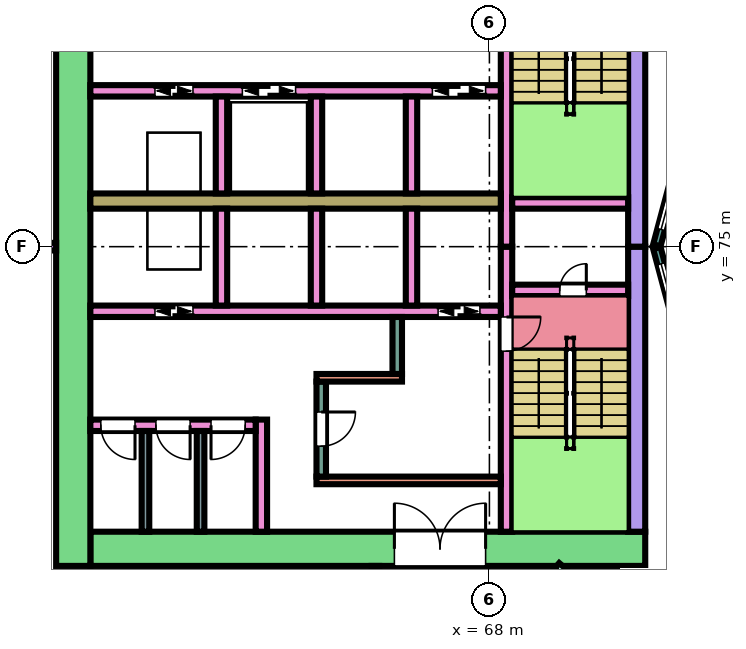
"""IFC4 building model, lengths in metres.
Left out: names, types, materials, properties, quantities, classifications, styles, units other than length and angle.
Written with IfcOpenShell. Run it as: python <this file> out.ifc"""

import sys

from ifc_helpers import new_model, si_unit, direction, frame, frame_2d, origin, place, context, subcontext, project, spatial, rectangle, extrude, element, fill, save


model = new_model("IFC4")
c1 = context("Model", 3, precision=1e-05, world=origin(), true_north=direction((0.0, 1.0)))
c2 = subcontext(c1, "Body", "Model", "MODEL_VIEW")
j1 = project(units=[si_unit("LENGTHUNIT", "METRE"), si_unit("PLANEANGLEUNIT", "RADIAN")], contexts=[c1])
p1 = place(None, origin())
s1 = spatial("IfcSite", under=j1, at=p1, CompositionType="ELEMENT")
p2 = place(p1, origin())
s2 = spatial("IfcBuilding", under=s1, at=p2, CompositionType="ELEMENT")
p3 = place(p2, frame((0.0, 0.0, 17.8)))
s3 = spatial("IfcBuildingStorey", under=s2, at=p3, CompositionType="ELEMENT", Elevation=17.8)
p4 = place(p3, frame((72.1, 67.05, 0.0), z_axis=(0.0, 0.0, 1.0), x_axis=(-1.0, 0.0, 0.0)))
e1 = element("IfcWall", 1, at=p4, inside=s3, PredefinedType="SHEAR", context=c2, shape_type="SweptSolid", body=[
    extrude(rectangle(XDim=14.6, YDim=0.9, at=frame_2d((7.3, 0.0))), origin(), (0.0, 0.0, 1.0), 5.55),
])
p5 = place(p4, frame((4.2, 0.0, 0.0)))
e2 = element("IfcOpeningElement", 2, at=p5, cuts=e1, PredefinedType="OPENING", context=c2, shape_type="SweptSolid", body=[
    extrude(rectangle(XDim=2.4, YDim=2.4, at=frame_2d((1.2, 1.2))), frame((0.0, 0.46, 0.0), z_axis=(0.0, -1.0, 0.0), x_axis=(1.0, 0.0, 0.0)), (0.0, 0.0, 1.0), 0.92),
])
for number, where, z_axis, x_axis in (
    (3, (71.875, 75.0, 0.0), (0.0, 0.0, 1.0), (0.0, -1.0, 0.0)),
    (4, (71.875, 82.5, 0.0), (0.0, 0.0, 1.0), (0.0, -1.0, 0.0)),
):
    element("IfcWall", number, at=place(p3, frame(where, z_axis=z_axis, x_axis=x_axis)), inside=s3, PredefinedType="SHEAR", context=c2, shape_type="SweptSolid", body=[
        extrude(rectangle(XDim=7.5, YDim=0.45, at=frame_2d((3.75, 0.0))), origin(), (0.0, 0.0, 1.0), 5.55),
    ])
p6 = place(p3, frame((57.05, 83.4, 0.0), z_axis=(0.0, 0.0, 1.0), x_axis=(0.0, -1.0, 0.0)))
e5 = element("IfcWall", 5, at=p6, inside=s3, PredefinedType="SHEAR", context=c2, shape_type="SweptSolid", body=[
    extrude(rectangle(XDim=16.8, YDim=0.9, at=frame_2d((8.4, 0.0))), origin(), (0.0, 0.0, 1.0), 5.55),
])
p7 = place(p3, frame((68.45, 75.0, 0.0), z_axis=(0.0, 0.0, 1.0), x_axis=(0.0, -1.0, 0.0)))
e6 = element("IfcWall", 6, at=p7, inside=s3, PredefinedType="SHEAR", context=c2, shape_type="SweptSolid", body=[
    extrude(rectangle(XDim=7.5, YDim=0.3, at=frame_2d((3.75, 0.0))), origin(), (0.0, 0.0, 1.0), 5.55),
])
p8 = place(p7, frame((1.85, 0.0, 0.0)))
e7 = element("IfcOpeningElement", 7, at=p8, cuts=e6, PredefinedType="OPENING", context=c2, shape_type="SweptSolid", body=[
    extrude(rectangle(XDim=0.9, YDim=2.1, at=frame_2d((0.45, 1.05))), frame((0.0, 0.16, 0.0), z_axis=(0.0, -1.0, 0.0), x_axis=(1.0, 0.0, 0.0)), (0.0, 0.0, 1.0), 0.32),
])
p9 = place(p3, frame((68.45, 82.5, 0.0), z_axis=(0.0, 0.0, 1.0), x_axis=(0.0, -1.0, 0.0)))
e8 = element("IfcWall", 8, at=p9, inside=s3, PredefinedType="SHEAR", context=c2, shape_type="SweptSolid", body=[
    extrude(rectangle(XDim=7.5, YDim=0.3, at=frame_2d((3.75, 0.0))), origin(), (0.0, 0.0, 1.0), 5.55),
])
p10 = place(p9, frame((0.15, 0.0, 0.0)))
e9 = element("IfcOpeningElement", 9, at=p10, cuts=e8, PredefinedType="OPENING", context=c2, shape_type="SweptSolid", body=[
    extrude(rectangle(XDim=0.9, YDim=2.1, at=frame_2d((0.45, 1.05))), frame((0.0, 0.16, 0.0), z_axis=(0.0, -1.0, 0.0), x_axis=(1.0, 0.0, 0.0)), (0.0, 0.0, 1.0), 0.32),
])
p11 = place(p3, frame((71.65, 73.85, 0.0), z_axis=(0.0, 0.0, 1.0), x_axis=(-1.0, 0.0, 0.0)))
e10 = element("IfcWall", 10, at=p11, inside=s3, PredefinedType="SHEAR", context=c2, shape_type="SweptSolid", body=[
    extrude(rectangle(XDim=3.05, YDim=0.3, at=frame_2d((1.525, 0.0))), origin(), (0.0, 0.0, 1.0), 5.55),
])
p12 = place(p11, frame((1.1, 0.0, 0.0)))
e11 = element("IfcOpeningElement", 11, at=p12, cuts=e10, PredefinedType="OPENING", context=c2, shape_type="SweptSolid", body=[
    extrude(rectangle(XDim=0.7, YDim=2.0, at=frame_2d((0.35, 1.0))), frame((0.0, 0.16, 0.0), z_axis=(0.0, -1.0, 0.0), x_axis=(1.0, 0.0, 0.0)), (0.0, 0.0, 1.0), 0.32),
])
p13 = place(p3, frame((71.65, 76.15, 0.0), z_axis=(0.0, 0.0, 1.0), x_axis=(-1.0, 0.0, 0.0)))
e12 = element("IfcWall", 12, at=p13, inside=s3, PredefinedType="SHEAR", context=c2, shape_type="SweptSolid", body=[
    extrude(rectangle(XDim=3.05, YDim=0.3, at=frame_2d((1.525, 0.0))), origin(), (0.0, 0.0, 1.0), 5.55),
])
p14 = place(p3, frame((68.3, 73.3, 0.0), z_axis=(0.0, 0.0, 1.0), x_axis=(-1.0, 0.0, 0.0)))
e13 = element("IfcWall", 13, at=p14, inside=s3, PredefinedType="SHEAR", context=c2, shape_type="SweptSolid", body=[
    extrude(rectangle(XDim=10.8, YDim=0.3, at=frame_2d((5.4, 0.0))), origin(), (0.0, 0.0, 1.0), 5.55),
])
p15 = place(p14, frame((0.55, 0.0, 0.0)))
e14 = element("IfcOpeningElement", 14, at=p15, cuts=e13, PredefinedType="OPENING", context=c2, shape_type="SweptSolid", body=[
    extrude(rectangle(XDim=1.1, YDim=2.1, at=frame_2d((0.55, 1.05))), frame((0.0, 0.16, 0.0), z_axis=(0.0, -1.0, 0.0), x_axis=(1.0, 0.0, 0.0)), (0.0, 0.0, 1.0), 0.32),
])
p16 = place(p14, frame((8.1, 0.0, 0.0)))
e15 = element("IfcOpeningElement", 15, at=p16, cuts=e13, PredefinedType="OPENING", context=c2, shape_type="SweptSolid", body=[
    extrude(rectangle(XDim=1.0, YDim=2.1, at=frame_2d((0.5, 1.05))), frame((0.0, 0.16, 0.0), z_axis=(0.0, -1.0, 0.0), x_axis=(1.0, 0.0, 0.0)), (0.0, 0.0, 1.0), 0.32),
])
p17 = place(p3, frame((68.3, 76.2, 0.0), z_axis=(0.0, 0.0, 1.0), x_axis=(-1.0, 0.0, 0.0)))
e16 = element("IfcWall", 16, at=p17, inside=s3, PredefinedType="SHEAR", context=c2, shape_type="SweptSolid", body=[
    extrude(rectangle(XDim=10.8, YDim=0.4, at=frame_2d((5.4, 0.0))), origin(), (0.0, 0.0, 1.0), 5.55),
])
p18 = place(p3, frame((68.3, 79.1, 0.0), z_axis=(0.0, 0.0, 1.0), x_axis=(-1.0, 0.0, 0.0)))
e17 = element("IfcWall", 17, at=p18, inside=s3, PredefinedType="SHEAR", context=c2, shape_type="SweptSolid", body=[
    extrude(rectangle(XDim=10.8, YDim=0.3, at=frame_2d((5.4, 0.0))), origin(), (0.0, 0.0, 1.0), 5.55),
])
p19 = place(p18, frame((0.4, 0.0, 0.0)))
e18 = element("IfcOpeningElement", 18, at=p19, cuts=e17, PredefinedType="OPENING", context=c2, shape_type="SweptSolid", body=[
    extrude(rectangle(XDim=1.4, YDim=2.1, at=frame_2d((0.7, 1.05))), frame((0.0, 0.16, 0.0), z_axis=(0.0, -1.0, 0.0), x_axis=(1.0, 0.0, 0.0)), (0.0, 0.0, 1.0), 0.32),
])
p20 = place(p18, frame((5.4, 0.0, 0.0)))
e19 = element("IfcOpeningElement", 19, at=p20, cuts=e17, PredefinedType="OPENING", context=c2, shape_type="SweptSolid", body=[
    extrude(rectangle(XDim=1.4, YDim=2.1, at=frame_2d((0.7, 1.05))), frame((0.0, 0.16, 0.0), z_axis=(0.0, -1.0, 0.0), x_axis=(1.0, 0.0, 0.0)), (0.0, 0.0, 1.0), 0.32),
])
p21 = place(p18, frame((8.1, 0.0, 0.0)))
e20 = element("IfcOpeningElement", 20, at=p21, cuts=e17, PredefinedType="OPENING", context=c2, shape_type="SweptSolid", body=[
    extrude(rectangle(XDim=1.0, YDim=2.1, at=frame_2d((0.5, 1.05))), frame((0.0, 0.16, 0.0), z_axis=(0.0, -1.0, 0.0), x_axis=(1.0, 0.0, 0.0)), (0.0, 0.0, 1.0), 0.32),
])
for number, where, z_axis, x_axis in (
    (21, (65.95, 76.0, 0.0), (0.0, 0.0, 1.0), (0.0, -1.0, 0.0)),
    (22, (63.45, 76.0, 0.0), (0.0, 0.0, 1.0), (0.0, -1.0, 0.0)),
    (23, (60.95, 76.0, 0.0), (0.0, 0.0, 1.0), (0.0, -1.0, 0.0)),
    (24, (65.95, 78.95, 0.0), (0.0, 0.0, 1.0), (0.0, -1.0, 0.0)),
    (25, (63.45, 78.95, 0.0), (0.0, 0.0, 1.0), (0.0, -1.0, 0.0)),
    (26, (60.95, 78.95, 0.0), (0.0, 0.0, 1.0), (0.0, -1.0, 0.0)),
):
    element("IfcWall", number, at=place(p3, frame(where, z_axis=z_axis, x_axis=x_axis)), inside=s3, PredefinedType="SHEAR", context=c2, shape_type="SweptSolid", body=[
        extrude(rectangle(XDim=2.55, YDim=0.3, at=frame_2d((1.275, 0.0))), origin(), (0.0, 0.0, 1.0), 5.55),
    ])
p22 = place(p3, frame((68.3, 68.85, 0.0), z_axis=(0.0, 0.0, 1.0), x_axis=(-1.0, 0.0, 0.0)))
e27 = element("IfcWall", 27, at=p22, inside=s3, PredefinedType="SHEAR", context=c2, shape_type="SweptSolid", body=[
    extrude(rectangle(XDim=4.85, YDim=0.2, at=frame_2d((2.425, 0.0))), origin(), (0.0, 0.0, 1.0), 5.55),
])
p23 = place(p3, frame((63.575, 71.45, 0.0), z_axis=(0.0, 0.0, 1.0), x_axis=(0.0, -1.0, 0.0)))
e28 = element("IfcWall", 28, at=p23, inside=s3, PredefinedType="SHEAR", context=c2, shape_type="SweptSolid", body=[
    extrude(rectangle(XDim=2.5, YDim=0.25, at=frame_2d((1.25, 0.0))), origin(), (0.0, 0.0, 1.0), 5.55),
])
p24 = place(p23, frame((0.8, 0.0, 0.0)))
e29 = element("IfcOpeningElement", 29, at=p24, cuts=e28, PredefinedType="OPENING", context=c2, shape_type="SweptSolid", body=[
    extrude(rectangle(XDim=0.9, YDim=2.1, at=frame_2d((0.45, 1.05))), frame((0.0, 0.135, 0.0), z_axis=(0.0, -1.0, 0.0), x_axis=(1.0, 0.0, 0.0)), (0.0, 0.0, 1.0), 0.27),
])
p25 = place(p3, frame((65.7, 71.55, 0.0), z_axis=(0.0, 0.0, 1.0), x_axis=(-1.0, 0.0, 0.0)))
e30 = element("IfcWall", 30, at=p25, inside=s3, PredefinedType="SHEAR", context=c2, shape_type="SweptSolid", body=[
    extrude(rectangle(XDim=2.25, YDim=0.2, at=frame_2d((1.125, 0.0))), origin(), (0.0, 0.0, 1.0), 5.55),
])
p26 = place(p3, frame((65.575, 73.15, 0.0), z_axis=(0.0, 0.0, 1.0), x_axis=(0.0, -1.0, 0.0)))
e31 = element("IfcWall", 31, at=p26, inside=s3, PredefinedType="SHEAR", context=c2, shape_type="SweptSolid", body=[
    extrude(rectangle(XDim=1.5, YDim=0.25, at=frame_2d((0.75, 0.0))), origin(), (0.0, 0.0, 1.0), 5.55),
])
p27 = place(p3, frame((62.0, 70.45, 0.0), z_axis=(0.0, 0.0, 1.0), x_axis=(0.0, -1.0, 0.0)))
e32 = element("IfcWall", 32, at=p27, inside=s3, PredefinedType="SHEAR", context=c2, shape_type="SweptSolid", body=[
    extrude(rectangle(XDim=2.95, YDim=0.3, at=frame_2d((1.475, 0.0))), origin(), (0.0, 0.0, 1.0), 5.55),
])
p28 = place(p3, frame((61.85, 70.3, 0.0), z_axis=(0.0, 0.0, 1.0), x_axis=(-1.0, 0.0, 0.0)))
e33 = element("IfcWall", 33, at=p28, inside=s3, PredefinedType="SHEAR", context=c2, shape_type="SweptSolid", body=[
    extrude(rectangle(XDim=4.35, YDim=0.3, at=frame_2d((2.175, 0.0))), origin(), (0.0, 0.0, 1.0), 5.55),
])
p29 = place(p28, frame((0.275, 0.0, 0.0)))
e34 = element("IfcOpeningElement", 34, at=p29, cuts=e33, PredefinedType="OPENING", context=c2, shape_type="SweptSolid", body=[
    extrude(rectangle(XDim=0.9, YDim=2.1, at=frame_2d((0.45, 1.05))), frame((0.0, 0.16, 0.0), z_axis=(0.0, -1.0, 0.0), x_axis=(1.0, 0.0, 0.0)), (0.0, 0.0, 1.0), 0.32),
])
p30 = place(p28, frame((1.725, 0.0, 0.0)))
e35 = element("IfcOpeningElement", 35, at=p30, cuts=e33, PredefinedType="OPENING", context=c2, shape_type="SweptSolid", body=[
    extrude(rectangle(XDim=0.9, YDim=2.1, at=frame_2d((0.45, 1.05))), frame((0.0, 0.16, 0.0), z_axis=(0.0, -1.0, 0.0), x_axis=(1.0, 0.0, 0.0)), (0.0, 0.0, 1.0), 0.32),
])
p31 = place(p28, frame((3.175, 0.0, 0.0)))
e36 = element("IfcOpeningElement", 36, at=p31, cuts=e33, PredefinedType="OPENING", context=c2, shape_type="SweptSolid", body=[
    extrude(rectangle(XDim=0.9, YDim=2.1, at=frame_2d((0.45, 1.05))), frame((0.0, 0.16, 0.0), z_axis=(0.0, -1.0, 0.0), x_axis=(1.0, 0.0, 0.0)), (0.0, 0.0, 1.0), 0.32),
])
p32 = place(p3, frame((73.415, 78.802, 0.0), z_axis=(0.0, 0.0, 1.0), x_axis=(-0.258789828301, -0.965933654434, 0.0)))
e37 = element("IfcWall", 37, at=p32, inside=s3, PredefinedType="NOTDEFINED", context=c2, shape_type="SweptSolid", body=[
    extrude(rectangle(XDim=3.936, YDim=0.2, at=frame_2d((1.968, 0.0))), origin(), (0.0, 0.0, 1.0), 6.0),
])
p33 = place(p32, frame((0.468, 0.0, 0.9)))
e38 = element("IfcOpeningElement", 38, at=p33, cuts=e37, PredefinedType="OPENING", context=c2, shape_type="SweptSolid", body=[
    extrude(rectangle(XDim=3.0, YDim=2.3, at=frame_2d((1.5, 1.15))), frame((0.0, 0.11, 0.0), z_axis=(0.0, -1.0, 0.0), x_axis=(1.0, 0.0, 0.0)), (0.0, 0.0, 1.0), 0.22),
])
p34 = place(p3, frame((72.396, 75.0, 0.0), z_axis=(0.0, 0.0, 1.0), x_axis=(0.258789828301, -0.965933654434, 0.0)))
e39 = element("IfcWall", 39, at=p34, inside=s3, PredefinedType="NOTDEFINED", context=c2, shape_type="SweptSolid", body=[
    extrude(rectangle(XDim=3.936, YDim=0.2, at=frame_2d((1.968, 0.0))), origin(), (0.0, 0.0, 1.0), 6.0),
])
p35 = place(p34, frame((0.468, 0.0, 0.9)))
e40 = element("IfcOpeningElement", 40, at=p35, cuts=e39, PredefinedType="OPENING", context=c2, shape_type="SweptSolid", body=[
    extrude(rectangle(XDim=3.0, YDim=2.3, at=frame_2d((1.5, 1.15))), frame((0.0, 0.11, 0.0), z_axis=(0.0, -1.0, 0.0), x_axis=(1.0, 0.0, 0.0)), (0.0, 0.0, 1.0), 0.22),
])
p36 = place(p3, frame((47.703, 75.0, 0.0), z_axis=(0.0, 0.0, 1.0), x_axis=(1.0, 0.0, 0.0)))
e41 = element("IfcWall", 41, at=p36, inside=s3, PredefinedType="PARTITIONING", context=c2, shape_type="SweptSolid", body=[
    extrude(rectangle(XDim=8.896, YDim=0.2, at=frame_2d((4.448, 0.0))), origin(), (0.0, 0.0, 1.0), 4.55),
])
p37 = place(p3, frame((65.0, 65.2, 0.0), z_axis=(0.0, 0.0, 1.0), x_axis=(0.0, 1.0, 0.0)))
e42 = element("IfcWall", 42, at=p37, inside=s3, PredefinedType="PARTITIONING", context=c2, shape_type="SweptSolid", body=[
    extrude(rectangle(XDim=1.399, YDim=0.2, at=frame_2d((0.7, 0.0))), origin(), (0.0, 0.0, 1.0), 5.55),
])
p38 = place(p37, frame((0.2, 0.0, 0.0)))
e43 = element("IfcOpeningElement", 43, at=p38, cuts=e42, PredefinedType="OPENING", context=c2, shape_type="SweptSolid", body=[
    extrude(rectangle(XDim=0.9, YDim=2.1, at=frame_2d((0.45, 1.05))), frame((0.0, 0.11, 0.0), z_axis=(0.0, -1.0, 0.0), x_axis=(1.0, 0.0, 0.0)), (0.0, 0.0, 1.0), 0.22),
])
p39 = place(p3, frame((69.771, 66.6, 0.0), z_axis=(0.0, 0.0, 1.0), x_axis=(0.758040611529, -0.652207352974, 0.0)))
e44 = element("IfcWall", 44, at=p39, inside=s3, PredefinedType="PARTITIONING", context=c2, shape_type="SweptSolid", body=[
    extrude(rectangle(XDim=4.625, YDim=0.2, at=frame_2d((2.312, 0.0))), origin(), (0.0, 0.0, 1.0), 5.55),
])
p40 = place(p39, frame((1.887, 0.0, 0.0)))
e45 = element("IfcOpeningElement", 45, at=p40, cuts=e44, PredefinedType="OPENING", context=c2, shape_type="SweptSolid", body=[
    extrude(rectangle(XDim=0.9, YDim=2.1, at=frame_2d((0.45, 1.05))), frame((0.0, 0.11, 0.0), z_axis=(0.0, -1.0, 0.0), x_axis=(1.0, 0.0, 0.0)), (0.0, 0.0, 1.0), 0.22),
])
for number, where, z_axis, x_axis in (
    (46, (60.4, 70.15, 0.0), (0.0, 0.0, 1.0), (0.0, -1.0, 0.0)),
    (47, (58.95, 70.15, 0.0), (0.0, 0.0, 1.0), (0.0, -1.0, 0.0)),
):
    element("IfcWall", number, at=place(p3, frame(where, z_axis=z_axis, x_axis=x_axis)), inside=s3, PredefinedType="PARTITIONING", context=c2, shape_type="SweptSolid", body=[
        extrude(rectangle(XDim=2.65, YDim=0.2, at=frame_2d((1.325, 0.0))), origin(), (0.0, 0.0, 1.0), 5.55),
    ])
p41 = place(p33, origin())
e48 = element("IfcWindow", 48, at=p41, inside=s3, PartitioningType="SINGLE_PANEL", PredefinedType="WINDOW", context=c2, shape_type="SweptSolid", body=[
    extrude(rectangle(XDim=3.0, YDim=2.3, at=frame_2d((1.5, 1.15))), frame((0.0, 0.03, 0.0), z_axis=(0.0, -1.0, 0.0), x_axis=(1.0, 0.0, 0.0)), (0.0, 0.0, 1.0), 0.06),
])
fill(e38, e48)
p42 = place(p35, origin())
e49 = element("IfcWindow", 49, at=p42, inside=s3, PartitioningType="SINGLE_PANEL", PredefinedType="WINDOW", context=c2, shape_type="SweptSolid", body=[
    extrude(rectangle(XDim=3.0, YDim=2.3, at=frame_2d((1.5, 1.15))), frame((0.0, 0.03, 0.0), z_axis=(0.0, -1.0, 0.0), x_axis=(1.0, 0.0, 0.0)), (0.0, 0.0, 1.0), 0.06),
])
fill(e40, e49)
p43 = place(p12, frame((0.7, 0.0, 0.0), z_axis=(0.0, 0.0, 1.0), x_axis=(-1.0, 0.0, 0.0)))
e50 = element("IfcDoor", 50, at=p43, inside=s3, OperationType="SINGLE_SWING_RIGHT", PredefinedType="DOOR", context=c2, shape_type="SweptSolid", body=[
    extrude(rectangle(XDim=0.7, YDim=2.0, at=frame_2d((0.35, 1.0))), frame((0.0, 0.025, 0.0), z_axis=(0.0, -1.0, 0.0), x_axis=(1.0, 0.0, 0.0)), (0.0, 0.0, 1.0), 0.05),
])
fill(e11, e50)
p44 = place(p8, origin())
e51 = element("IfcDoor", 51, at=p44, inside=s3, OperationType="SINGLE_SWING_LEFT", PredefinedType="DOOR", context=c2, shape_type="SweptSolid", body=[
    extrude(rectangle(XDim=0.9, YDim=2.1, at=frame_2d((0.45, 1.05))), frame((0.0, 0.025, 0.0), z_axis=(0.0, -1.0, 0.0), x_axis=(1.0, 0.0, 0.0)), (0.0, 0.0, 1.0), 0.05),
])
fill(e7, e51)
p45 = place(p15, origin())
e52 = element("IfcDoor", 52, at=p45, inside=s3, OperationType="DOUBLE_DOOR_SLIDING", PredefinedType="DOOR", context=c2, shape_type="SweptSolid", body=[
    extrude(rectangle(XDim=1.1, YDim=2.1, at=frame_2d((0.55, 1.05))), frame((0.0, 0.025, 0.0), z_axis=(0.0, -1.0, 0.0), x_axis=(1.0, 0.0, 0.0)), (0.0, 0.0, 1.0), 0.05),
])
fill(e14, e52)
p46 = place(p16, origin())
e53 = element("IfcDoor", 53, at=p46, inside=s3, OperationType="DOUBLE_DOOR_SLIDING", PredefinedType="DOOR", context=c2, shape_type="SweptSolid", body=[
    extrude(rectangle(XDim=1.0, YDim=2.1, at=frame_2d((0.5, 1.05))), frame((0.0, 0.025, 0.0), z_axis=(0.0, -1.0, 0.0), x_axis=(1.0, 0.0, 0.0)), (0.0, 0.0, 1.0), 0.05),
])
fill(e15, e53)
p47 = place(p19, origin())
e54 = element("IfcDoor", 54, at=p47, inside=s3, OperationType="DOUBLE_DOOR_SLIDING", PredefinedType="DOOR", context=c2, shape_type="SweptSolid", body=[
    extrude(rectangle(XDim=1.4, YDim=2.1, at=frame_2d((0.7, 1.05))), frame((0.0, 0.025, 0.0), z_axis=(0.0, -1.0, 0.0), x_axis=(1.0, 0.0, 0.0)), (0.0, 0.0, 1.0), 0.05),
])
fill(e18, e54)
p48 = place(p20, origin())
e55 = element("IfcDoor", 55, at=p48, inside=s3, OperationType="DOUBLE_DOOR_SLIDING", PredefinedType="DOOR", context=c2, shape_type="SweptSolid", body=[
    extrude(rectangle(XDim=1.4, YDim=2.1, at=frame_2d((0.7, 1.05))), frame((0.0, 0.025, 0.0), z_axis=(0.0, -1.0, 0.0), x_axis=(1.0, 0.0, 0.0)), (0.0, 0.0, 1.0), 0.05),
])
fill(e19, e55)
p49 = place(p21, origin())
e56 = element("IfcDoor", 56, at=p49, inside=s3, OperationType="DOUBLE_DOOR_SLIDING", PredefinedType="DOOR", context=c2, shape_type="SweptSolid", body=[
    extrude(rectangle(XDim=1.0, YDim=2.1, at=frame_2d((0.5, 1.05))), frame((0.0, 0.025, 0.0), z_axis=(0.0, -1.0, 0.0), x_axis=(1.0, 0.0, 0.0)), (0.0, 0.0, 1.0), 0.05),
])
fill(e20, e56)
p50 = place(p24, origin())
e57 = element("IfcDoor", 57, at=p50, inside=s3, OperationType="SINGLE_SWING_LEFT", PredefinedType="DOOR", context=c2, shape_type="SweptSolid", body=[
    extrude(rectangle(XDim=0.9, YDim=2.1, at=frame_2d((0.45, 1.05))), frame((0.0, 0.025, 0.0), z_axis=(0.0, -1.0, 0.0), x_axis=(1.0, 0.0, 0.0)), (0.0, 0.0, 1.0), 0.05),
])
fill(e29, e57)
p51 = place(p29, origin())
e58 = element("IfcDoor", 58, at=p51, inside=s3, OperationType="SINGLE_SWING_RIGHT", PredefinedType="DOOR", context=c2, shape_type="SweptSolid", body=[
    extrude(rectangle(XDim=0.9, YDim=2.1, at=frame_2d((0.45, 1.05))), frame((0.0, 0.025, 0.0), z_axis=(0.0, -1.0, 0.0), x_axis=(1.0, 0.0, 0.0)), (0.0, 0.0, 1.0), 0.05),
])
fill(e34, e58)
p52 = place(p30, origin())
e59 = element("IfcDoor", 59, at=p52, inside=s3, OperationType="SINGLE_SWING_LEFT", PredefinedType="DOOR", context=c2, shape_type="SweptSolid", body=[
    extrude(rectangle(XDim=0.9, YDim=2.1, at=frame_2d((0.45, 1.05))), frame((0.0, 0.025, 0.0), z_axis=(0.0, -1.0, 0.0), x_axis=(1.0, 0.0, 0.0)), (0.0, 0.0, 1.0), 0.05),
])
fill(e35, e59)
p53 = place(p31, origin())
e60 = element("IfcDoor", 60, at=p53, inside=s3, OperationType="SINGLE_SWING_LEFT", PredefinedType="DOOR", context=c2, shape_type="SweptSolid", body=[
    extrude(rectangle(XDim=0.9, YDim=2.1, at=frame_2d((0.45, 1.05))), frame((0.0, 0.025, 0.0), z_axis=(0.0, -1.0, 0.0), x_axis=(1.0, 0.0, 0.0)), (0.0, 0.0, 1.0), 0.05),
])
fill(e36, e60)
p54 = place(p5, frame((2.4, 0.0, 0.0), z_axis=(0.0, 0.0, 1.0), x_axis=(-1.0, 0.0, 0.0)))
e61 = element("IfcDoor", 61, at=p54, inside=s3, OperationType="DOUBLE_DOOR_SINGLE_SWING", PredefinedType="DOOR", context=c2, shape_type="SweptSolid", body=[
    extrude(rectangle(XDim=2.4, YDim=2.4, at=frame_2d((1.2, 1.2))), frame((0.0, 0.025, 0.0), z_axis=(0.0, -1.0, 0.0), x_axis=(1.0, 0.0, 0.0)), (0.0, 0.0, 1.0), 0.05),
])
fill(e2, e61)
save(model, sys.argv[1])
